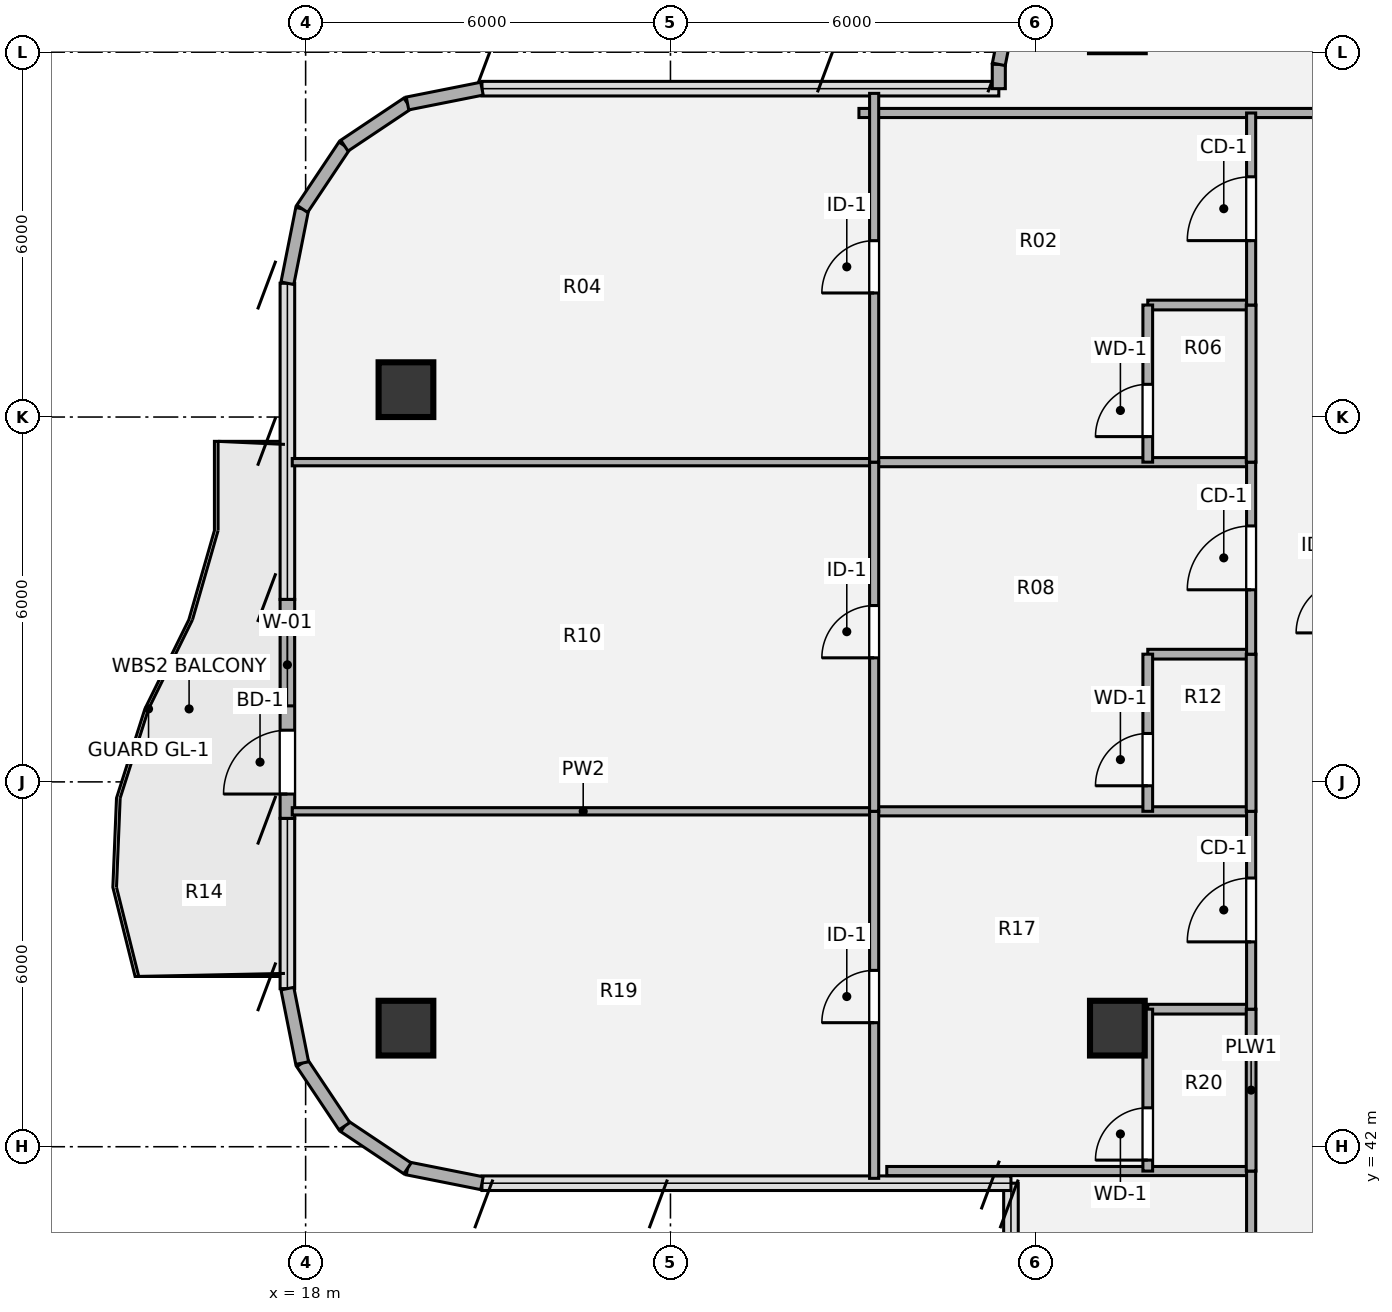
"""IFC4 building model, lengths in metres.
Left out: names, types, materials, properties, quantities, classifications, styles, units other than length and angle.
Written with IfcOpenShell. Run it as: python <this file> out.ifc"""

import sys

from ifc_helpers import new_model, si_unit, direction, frame, frame_2d, origin, origin_2d, place, context, subcontext, project, spatial, rectangle, hollow_circle, extrude, source, transform, mapped, element, fill, save


model = new_model("IFC4")
c1 = context("Model", 3, precision=1e-05, world=origin(), true_north=direction((0.0, 1.0)))
c2 = subcontext(c1, "Body", "Model", "MODEL_VIEW")
j1 = project(units=[si_unit("LENGTHUNIT", "METRE"), si_unit("PLANEANGLEUNIT", "RADIAN")], contexts=[c1])
p1 = place(None, origin())
s1 = spatial("IfcSite", under=j1, at=p1, CompositionType="ELEMENT")
p2 = place(p1, origin())
s2 = spatial("IfcBuilding", under=s1, at=p2, CompositionType="ELEMENT")
p3 = place(p2, frame((0.0, 0.0, 234.36)))
s3 = spatial("IfcBuildingStorey", under=s2, at=p3, CompositionType="ELEMENT", Elevation=234.36)
m1 = source(origin(), c2, "Body", "SweptSolid", [
    extrude(hollow_circle(Radius=0.45, WallThickness=0.032, at=origin_2d()), origin(), (0.0, 0.0, 1.0), 3.78),
])
for number, where, z_axis, x_axis in (
    (1, (19.65, 43.95, 0.0), (0.0, 0.0, 1.0), (1.0, 0.0, 0.0)),
    (2, (19.65, 54.45, 0.0), (0.0, 0.0, 1.0), (1.0, 0.0, 0.0)),
    (3, (31.35, 43.95, 0.0), (0.0, 0.0, 1.0), (1.0, 0.0, 0.0)),
):
    element("IfcColumn", number, at=place(p3, frame(where, z_axis=z_axis, x_axis=x_axis)), inside=s3, PredefinedType="COLUMN", context=c2, shape_type="MappedRepresentation", body=[
        mapped(m1, transform((0.0, 0.0, 0.0), x_axis=(1.0, 0.0, 0.0), y_axis=(0.0, 1.0, 0.0), z_axis=(0.0, 0.0, 1.0), scale=1.0)),
    ])
for number, where, z_axis, x_axis in (
    (4, (20.9, 41.4, 0.0), (0.0, 0.0, 1.0), (-0.981, 0.195, 0.0)),
    (5, (19.675, 41.644, 0.0), (0.0, 0.0, 1.0), (-0.831, 0.556, 0.0)),
    (6, (18.637, 42.337, 0.0), (0.0, 0.0, 1.0), (-0.556, 0.831, 0.0)),
    (7, (17.944, 43.375, 0.0), (0.0, 0.0, 1.0), (-0.195, 0.981, 0.0)),
):
    element("IfcWall", number, at=place(p3, frame(where, z_axis=z_axis, x_axis=x_axis)), inside=s3, PredefinedType="SOLIDWALL", context=c2, shape_type="SweptSolid", body=[
        extrude(rectangle(XDim=1.249, YDim=0.215, at=frame_2d((0.624, 0.0))), origin(), (0.0, 0.0, 1.0), 3.53),
    ])
p4 = place(p3, frame((17.7, 47.4, 0.0), z_axis=(0.0, 0.0, 1.0), x_axis=(0.0, 1.0, 0.0)))
e8 = element("IfcWall", 8, at=p4, inside=s3, PredefinedType="SOLIDWALL", context=c2, shape_type="SweptSolid", body=[
    extrude(rectangle(XDim=3.6, YDim=0.24, at=frame_2d((1.8, 0.0))), origin(), (0.0, 0.0, 1.0), 3.53),
])
p5 = place(p4, frame((0.4, 0.0, 0.0)))
e9 = element("IfcOpeningElement", 9, at=p5, cuts=e8, PredefinedType="OPENING", context=c2, shape_type="SweptSolid", body=[
    extrude(rectangle(XDim=1.05, YDim=2.15, at=origin_2d()), frame((0.525, 0.13, 1.075), z_axis=(0.0, -1.0, 0.0), x_axis=(1.0, 0.0, 0.0)), (0.0, 0.0, 1.0), 0.26),
])
p6 = place(p4, frame((1.85, 0.0, 0.85)))
e10 = element("IfcOpeningElement", 10, at=p6, cuts=e8, PredefinedType="OPENING", context=c2, shape_type="SweptSolid", body=[
    extrude(rectangle(XDim=1.35, YDim=1.35, at=origin_2d()), frame((0.675, 0.13, 0.675), z_axis=(0.0, -1.0, 0.0), x_axis=(1.0, 0.0, 0.0)), (0.0, 0.0, 1.0), 0.26),
])
for number, where, z_axis, x_axis in (
    (11, (17.7, 56.2, 0.0), (0.0, 0.0, 1.0), (0.195, 0.981, 0.0)),
    (12, (17.944, 57.425, 0.0), (0.0, 0.0, 1.0), (0.556, 0.831, 0.0)),
    (13, (18.637, 58.463, 0.0), (0.0, 0.0, 1.0), (0.831, 0.556, 0.0)),
    (14, (19.675, 59.156, 0.0), (0.0, 0.0, 1.0), (0.981, 0.195, 0.0)),
):
    element("IfcWall", number, at=place(p3, frame(where, z_axis=z_axis, x_axis=x_axis)), inside=s3, PredefinedType="SOLIDWALL", context=c2, shape_type="SweptSolid", body=[
        extrude(rectangle(XDim=1.249, YDim=0.215, at=frame_2d((0.624, 0.0))), origin(), (0.0, 0.0, 1.0), 3.53),
    ])
p7 = place(p3, frame((29.4, 59.4, 0.0), z_axis=(0.0, 0.0, 1.0), x_axis=(0.0, 1.0, 0.0)))
e15 = element("IfcWall", 15, at=p7, inside=s3, PredefinedType="SOLIDWALL", context=c2, shape_type="SweptSolid", body=[
    extrude(rectangle(XDim=0.4, YDim=0.215, at=frame_2d((0.2, 0.0))), origin(), (0.0, 0.0, 1.0), 3.53),
])
p8 = place(p3, frame((29.4, 59.8, 0.0), z_axis=(0.0, 0.0, 1.0), x_axis=(0.195190360752, 0.980765376158, 0.0)))
e16 = element("IfcWall", 16, at=p8, inside=s3, PredefinedType="SOLIDWALL", context=c2, shape_type="SweptSolid", body=[
    extrude(rectangle(XDim=1.014, YDim=0.215, at=frame_2d((0.507, 0.0))), origin(), (0.0, 0.0, 1.0), 3.53),
])
p9 = place(p3, frame((27.558, 41.6, 0.0), z_axis=(0.0, 0.0, 1.0), x_axis=(1.0, 0.0, 0.0)))
e17 = element("IfcWall", 17, at=p9, inside=s3, PredefinedType="PARTITIONING", context=c2, shape_type="SweptSolid", body=[
    extrude(rectangle(XDim=5.992, YDim=0.15, at=frame_2d((2.996, 0.0))), origin(), (0.0, 0.0, 1.0), 3.5),
])
p10 = place(p3, frame((31.85, 44.262, 0.0), z_axis=(0.0, 0.0, 1.0), x_axis=(1.0, 0.0, 0.0)))
e18 = element("IfcWall", 18, at=p10, inside=s3, PredefinedType="PLUMBINGWALL", context=c2, shape_type="SweptSolid", body=[
    extrude(rectangle(XDim=1.7, YDim=0.16, at=frame_2d((0.85, 0.0))), origin(), (0.0, 0.0, 1.0), 2.903),
])
p11 = place(p3, frame((17.78, 47.516, 0.0), z_axis=(0.0, 0.0, 1.0), x_axis=(1.0, 0.0, 0.0)))
e19 = element("IfcWall", 19, at=p11, inside=s3, PredefinedType="PARTITIONING", context=c2, shape_type="SweptSolid", body=[
    extrude(rectangle(XDim=9.57, YDim=0.12, at=frame_2d((4.785, 0.0))), origin(), (0.0, 0.0, 1.0), 2.982),
])
p12 = place(p3, frame((27.35, 47.516, 0.0), z_axis=(0.0, 0.0, 1.0), x_axis=(1.0, 0.0, 0.0)))
e20 = element("IfcWall", 20, at=p12, inside=s3, PredefinedType="PARTITIONING", context=c2, shape_type="SweptSolid", body=[
    extrude(rectangle(XDim=6.2, YDim=0.15, at=frame_2d((3.1, 0.0))), origin(), (0.0, 0.0, 1.0), 2.982),
])
p13 = place(p3, frame((31.85, 50.1, 0.0), z_axis=(0.0, 0.0, 1.0), x_axis=(1.0, 0.0, 0.0)))
e21 = element("IfcWall", 21, at=p13, inside=s3, PredefinedType="PLUMBINGWALL", context=c2, shape_type="SweptSolid", body=[
    extrude(rectangle(XDim=1.7, YDim=0.16, at=frame_2d((0.85, 0.0))), origin(), (0.0, 0.0, 1.0), 3.259),
])
p14 = place(p3, frame((17.78, 53.258, 0.0), z_axis=(0.0, 0.0, 1.0), x_axis=(1.0, 0.0, 0.0)))
e22 = element("IfcWall", 22, at=p14, inside=s3, PredefinedType="PARTITIONING", context=c2, shape_type="SweptSolid", body=[
    extrude(rectangle(XDim=9.57, YDim=0.12, at=frame_2d((4.785, 0.0))), origin(), (0.0, 0.0, 1.0), 3.055),
])
p15 = place(p3, frame((27.35, 53.258, 0.0), z_axis=(0.0, 0.0, 1.0), x_axis=(1.0, 0.0, 0.0)))
e23 = element("IfcWall", 23, at=p15, inside=s3, PredefinedType="PARTITIONING", context=c2, shape_type="SweptSolid", body=[
    extrude(rectangle(XDim=6.2, YDim=0.15, at=frame_2d((3.1, 0.0))), origin(), (0.0, 0.0, 1.0), 3.055),
])
p16 = place(p3, frame((31.85, 55.842, 0.0), z_axis=(0.0, 0.0, 1.0), x_axis=(1.0, 0.0, 0.0)))
e24 = element("IfcWall", 24, at=p16, inside=s3, PredefinedType="PLUMBINGWALL", context=c2, shape_type="SweptSolid", body=[
    extrude(rectangle(XDim=1.7, YDim=0.16, at=frame_2d((0.85, 0.0))), origin(), (0.0, 0.0, 1.0), 3.259),
])
p17 = place(p3, frame((27.1, 59.0, 0.0), z_axis=(0.0, 0.0, 1.0), x_axis=(1.0, 0.0, 0.0)))
e25 = element("IfcWall", 25, at=p17, inside=s3, PredefinedType="PARTITIONING", context=c2, shape_type="SweptSolid", body=[
    extrude(rectangle(XDim=17.8, YDim=0.15, at=frame_2d((8.9, 0.0))), origin(), (0.0, 0.0, 1.0), 3.308),
])
p18 = place(p17, frame((8.375, 0.0, 0.0)))
e26 = element("IfcOpeningElement", 26, at=p18, cuts=e25, PredefinedType="OPENING", context=c2, shape_type="SweptSolid", body=[
    extrude(rectangle(XDim=1.05, YDim=2.1, at=origin_2d()), frame((0.525, 0.085, 1.05), z_axis=(0.0, -1.0, 0.0), x_axis=(1.0, 0.0, 0.0)), (0.0, 0.0, 1.0), 0.17),
])
p19 = place(p3, frame((27.35, 41.48, 0.0), z_axis=(0.0, 0.0, 1.0), x_axis=(0.0, 1.0, 0.0)))
e27 = element("IfcWall", 27, at=p19, inside=s3, PredefinedType="PARTITIONING", context=c2, shape_type="SweptSolid", body=[
    extrude(rectangle(XDim=6.036, YDim=0.15, at=frame_2d((3.018, 0.0))), origin(), (0.0, 0.0, 1.0), 3.5),
])
p20 = place(p19, frame((2.56, 0.0, 0.0)))
e28 = element("IfcOpeningElement", 28, at=p20, cuts=e27, PredefinedType="OPENING", context=c2, shape_type="SweptSolid", body=[
    extrude(rectangle(XDim=0.86, YDim=2.1, at=origin_2d()), frame((0.43, 0.085, 1.05), z_axis=(0.0, -1.0, 0.0), x_axis=(1.0, 0.0, 0.0)), (0.0, 0.0, 1.0), 0.17),
])
p21 = place(p3, frame((27.35, 47.516, 0.0), z_axis=(0.0, 0.0, 1.0), x_axis=(0.0, 1.0, 0.0)))
e29 = element("IfcWall", 29, at=p21, inside=s3, PredefinedType="PARTITIONING", context=c2, shape_type="SweptSolid", body=[
    extrude(rectangle(XDim=5.742, YDim=0.15, at=frame_2d((2.871, 0.0))), origin(), (0.0, 0.0, 1.0), 3.5),
])
p22 = place(p21, frame((2.524, 0.0, 0.0)))
e30 = element("IfcOpeningElement", 30, at=p22, cuts=e29, PredefinedType="OPENING", context=c2, shape_type="SweptSolid", body=[
    extrude(rectangle(XDim=0.86, YDim=2.1, at=origin_2d()), frame((0.43, 0.085, 1.05), z_axis=(0.0, -1.0, 0.0), x_axis=(1.0, 0.0, 0.0)), (0.0, 0.0, 1.0), 0.17),
])
p23 = place(p3, frame((27.35, 53.258, 0.0), z_axis=(0.0, 0.0, 1.0), x_axis=(0.0, 1.0, 0.0)))
e31 = element("IfcWall", 31, at=p23, inside=s3, PredefinedType="PARTITIONING", context=c2, shape_type="SweptSolid", body=[
    extrude(rectangle(XDim=6.064, YDim=0.15, at=frame_2d((3.032, 0.0))), origin(), (0.0, 0.0, 1.0), 3.5),
])
p24 = place(p23, frame((2.782, 0.0, 0.0)))
e32 = element("IfcOpeningElement", 32, at=p24, cuts=e31, PredefinedType="OPENING", context=c2, shape_type="SweptSolid", body=[
    extrude(rectangle(XDim=0.86, YDim=2.1, at=origin_2d()), frame((0.43, 0.085, 1.05), z_axis=(0.0, -1.0, 0.0), x_axis=(1.0, 0.0, 0.0)), (0.0, 0.0, 1.0), 0.17),
])
p25 = place(p3, frame((31.85, 41.6, 0.0), z_axis=(0.0, 0.0, 1.0), x_axis=(0.0, 1.0, 0.0)))
e33 = element("IfcWall", 33, at=p25, inside=s3, PredefinedType="PLUMBINGWALL", context=c2, shape_type="SweptSolid", body=[
    extrude(rectangle(XDim=2.662, YDim=0.16, at=frame_2d((1.331, 0.0))), origin(), (0.0, 0.0, 1.0), 3.5),
])
p26 = place(p25, frame((0.18, 0.0, 0.0)))
e34 = element("IfcOpeningElement", 34, at=p26, cuts=e33, PredefinedType="OPENING", context=c2, shape_type="SweptSolid", body=[
    extrude(rectangle(XDim=0.86, YDim=2.1, at=origin_2d()), frame((0.43, 0.09, 1.05), z_axis=(0.0, -1.0, 0.0), x_axis=(1.0, 0.0, 0.0)), (0.0, 0.0, 1.0), 0.18),
])
p27 = place(p3, frame((31.85, 47.516, 0.0), z_axis=(0.0, 0.0, 1.0), x_axis=(0.0, 1.0, 0.0)))
e35 = element("IfcWall", 35, at=p27, inside=s3, PredefinedType="PLUMBINGWALL", context=c2, shape_type="SweptSolid", body=[
    extrude(rectangle(XDim=2.584, YDim=0.16, at=frame_2d((1.292, 0.0))), origin(), (0.0, 0.0, 1.0), 3.5),
])
p28 = place(p27, frame((0.42, 0.0, 0.0)))
e36 = element("IfcOpeningElement", 36, at=p28, cuts=e35, PredefinedType="OPENING", context=c2, shape_type="SweptSolid", body=[
    extrude(rectangle(XDim=0.86, YDim=2.1, at=origin_2d()), frame((0.43, 0.09, 1.05), z_axis=(0.0, -1.0, 0.0), x_axis=(1.0, 0.0, 0.0)), (0.0, 0.0, 1.0), 0.18),
])
p29 = place(p3, frame((31.85, 53.258, 0.0), z_axis=(0.0, 0.0, 1.0), x_axis=(0.0, 1.0, 0.0)))
e37 = element("IfcWall", 37, at=p29, inside=s3, PredefinedType="PLUMBINGWALL", context=c2, shape_type="SweptSolid", body=[
    extrude(rectangle(XDim=2.584, YDim=0.16, at=frame_2d((1.292, 0.0))), origin(), (0.0, 0.0, 1.0), 3.5),
])
p30 = place(p29, frame((0.42, 0.0, 0.0)))
e38 = element("IfcOpeningElement", 38, at=p30, cuts=e37, PredefinedType="OPENING", context=c2, shape_type="SweptSolid", body=[
    extrude(rectangle(XDim=0.86, YDim=2.1, at=origin_2d()), frame((0.43, 0.09, 1.05), z_axis=(0.0, -1.0, 0.0), x_axis=(1.0, 0.0, 0.0)), (0.0, 0.0, 1.0), 0.18),
])
p31 = place(p3, frame((33.55, 22.8, 0.0), z_axis=(0.0, 0.0, 1.0), x_axis=(0.0, 1.0, 0.0)))
e39 = element("IfcWall", 39, at=p31, inside=s3, PredefinedType="PARTITIONING", context=c2, shape_type="SweptSolid", body=[
    extrude(rectangle(XDim=18.8, YDim=0.15, at=frame_2d((9.4, 0.0))), origin(), (0.0, 0.0, 1.0), 3.5),
])
p32 = place(p31, frame((8.84, 0.0, 0.0)))
e40 = element("IfcOpeningElement", 40, at=p32, cuts=e39, PredefinedType="OPENING", context=c2, shape_type="SweptSolid", body=[
    extrude(rectangle(XDim=0.86, YDim=2.1, at=origin_2d()), frame((0.43, 0.085, 1.05), z_axis=(0.0, -1.0, 0.0), x_axis=(1.0, 0.0, 0.0)), (0.0, 0.0, 1.0), 0.17),
])
p33 = place(p3, frame((33.55, 41.6, 0.0), z_axis=(0.0, 0.0, 1.0), x_axis=(0.0, 1.0, 0.0)))
e41 = element("IfcWall", 41, at=p33, inside=s3, PredefinedType="PLUMBINGWALL", context=c2, shape_type="SweptSolid", body=[
    extrude(rectangle(XDim=2.662, YDim=0.16, at=frame_2d((1.331, 0.0))), origin(), (0.0, 0.0, 1.0), 3.5),
])
p34 = place(p3, frame((33.55, 44.262, 0.0), z_axis=(0.0, 0.0, 1.0), x_axis=(0.0, 1.0, 0.0)))
e42 = element("IfcWall", 42, at=p34, inside=s3, PredefinedType="PARTITIONING", context=c2, shape_type="SweptSolid", body=[
    extrude(rectangle(XDim=3.254, YDim=0.15, at=frame_2d((1.627, 0.0))), origin(), (0.0, 0.0, 1.0), 3.5),
])
p35 = place(p34, frame((1.107, 0.0, 0.0)))
e43 = element("IfcOpeningElement", 43, at=p35, cuts=e42, PredefinedType="OPENING", context=c2, shape_type="SweptSolid", body=[
    extrude(rectangle(XDim=1.05, YDim=2.1, at=origin_2d()), frame((0.525, 0.085, 1.05), z_axis=(0.0, -1.0, 0.0), x_axis=(1.0, 0.0, 0.0)), (0.0, 0.0, 1.0), 0.17),
])
p36 = place(p3, frame((33.55, 47.516, 0.0), z_axis=(0.0, 0.0, 1.0), x_axis=(0.0, 1.0, 0.0)))
e44 = element("IfcWall", 44, at=p36, inside=s3, PredefinedType="PLUMBINGWALL", context=c2, shape_type="SweptSolid", body=[
    extrude(rectangle(XDim=2.584, YDim=0.16, at=frame_2d((1.292, 0.0))), origin(), (0.0, 0.0, 1.0), 3.5),
])
p37 = place(p3, frame((33.55, 50.1, 0.0), z_axis=(0.0, 0.0, 1.0), x_axis=(0.0, 1.0, 0.0)))
e45 = element("IfcWall", 45, at=p37, inside=s3, PredefinedType="PARTITIONING", context=c2, shape_type="SweptSolid", body=[
    extrude(rectangle(XDim=3.158, YDim=0.15, at=frame_2d((1.579, 0.0))), origin(), (0.0, 0.0, 1.0), 3.5),
])
p38 = place(p37, frame((1.059, 0.0, 0.0)))
e46 = element("IfcOpeningElement", 46, at=p38, cuts=e45, PredefinedType="OPENING", context=c2, shape_type="SweptSolid", body=[
    extrude(rectangle(XDim=1.05, YDim=2.1, at=origin_2d()), frame((0.525, 0.085, 1.05), z_axis=(0.0, -1.0, 0.0), x_axis=(1.0, 0.0, 0.0)), (0.0, 0.0, 1.0), 0.17),
])
p39 = place(p3, frame((33.55, 53.258, 0.0), z_axis=(0.0, 0.0, 1.0), x_axis=(0.0, 1.0, 0.0)))
e47 = element("IfcWall", 47, at=p39, inside=s3, PredefinedType="PLUMBINGWALL", context=c2, shape_type="SweptSolid", body=[
    extrude(rectangle(XDim=2.584, YDim=0.16, at=frame_2d((1.292, 0.0))), origin(), (0.0, 0.0, 1.0), 3.5),
])
p40 = place(p3, frame((33.55, 55.842, 0.0), z_axis=(0.0, 0.0, 1.0), x_axis=(0.0, 1.0, 0.0)))
e48 = element("IfcWall", 48, at=p40, inside=s3, PredefinedType="PARTITIONING", context=c2, shape_type="SweptSolid", body=[
    extrude(rectangle(XDim=3.158, YDim=0.15, at=frame_2d((1.579, 0.0))), origin(), (0.0, 0.0, 1.0), 3.5),
])
p41 = place(p40, frame((1.059, 0.0, 0.0)))
e49 = element("IfcOpeningElement", 49, at=p41, cuts=e48, PredefinedType="OPENING", context=c2, shape_type="SweptSolid", body=[
    extrude(rectangle(XDim=1.05, YDim=2.1, at=origin_2d()), frame((0.525, 0.085, 1.05), z_axis=(0.0, -1.0, 0.0), x_axis=(1.0, 0.0, 0.0)), (0.0, 0.0, 1.0), 0.17),
])
m2 = source(origin(), c2, "Body", "SweptSolid", [
    extrude(rectangle(XDim=1.05, YDim=2.15, at=origin_2d()), frame((0.525, 0.025, 1.075), z_axis=(0.0, -1.0, 0.0), x_axis=(1.0, 0.0, 0.0)), (0.0, 0.0, 1.0), 0.05),
])
p42 = place(p5, origin())
e50 = element("IfcDoor", 50, at=p42, inside=s3, OperationType="SINGLE_SWING_LEFT", PredefinedType="DOOR", context=c2, shape_type="MappedRepresentation", body=[
    mapped(m2, transform((0.0, 0.0, 0.0), x_axis=(1.0, 0.0, 0.0), y_axis=(0.0, 1.0, 0.0), z_axis=(0.0, 0.0, 1.0), scale=1.0)),
])
fill(e9, e50)
m3 = source(origin(), c2, "Body", "SweptSolid", [
    extrude(rectangle(XDim=1.35, YDim=1.35, at=origin_2d()), frame((0.675, 0.03, 0.675), z_axis=(0.0, -1.0, 0.0), x_axis=(1.0, 0.0, 0.0)), (0.0, 0.0, 1.0), 0.06),
])
p43 = place(p6, origin())
e51 = element("IfcWindow", 51, at=p43, inside=s3, PartitioningType="SINGLE_PANEL", PredefinedType="WINDOW", context=c2, shape_type="MappedRepresentation", body=[
    mapped(m3, transform((0.0, 0.0, 0.0), x_axis=(1.0, 0.0, 0.0), y_axis=(0.0, 1.0, 0.0), z_axis=(0.0, 0.0, 1.0), scale=1.0)),
])
fill(e10, e51)
m4 = source(origin(), c2, "Body", "SweptSolid", [
    extrude(rectangle(XDim=0.86, YDim=2.1, at=origin_2d()), frame((0.43, 0.025, 1.05), z_axis=(0.0, -1.0, 0.0), x_axis=(1.0, 0.0, 0.0)), (0.0, 0.0, 1.0), 0.05),
])
p44 = place(p20, origin())
e52 = element("IfcDoor", 52, at=p44, inside=s3, OperationType="SINGLE_SWING_LEFT", PredefinedType="DOOR", context=c2, shape_type="MappedRepresentation", body=[
    mapped(m4, transform((0.0, 0.0, 0.0), x_axis=(1.0, 0.0, 0.0), y_axis=(0.0, 1.0, 0.0), z_axis=(0.0, 0.0, 1.0), scale=1.0)),
])
fill(e28, e52)
p45 = place(p22, origin())
e53 = element("IfcDoor", 53, at=p45, inside=s3, OperationType="SINGLE_SWING_LEFT", PredefinedType="DOOR", context=c2, shape_type="MappedRepresentation", body=[
    mapped(m4, transform((0.0, 0.0, 0.0), x_axis=(1.0, 0.0, 0.0), y_axis=(0.0, 1.0, 0.0), z_axis=(0.0, 0.0, 1.0), scale=1.0)),
])
fill(e30, e53)
p46 = place(p24, origin())
e54 = element("IfcDoor", 54, at=p46, inside=s3, OperationType="SINGLE_SWING_LEFT", PredefinedType="DOOR", context=c2, shape_type="MappedRepresentation", body=[
    mapped(m4, transform((0.0, 0.0, 0.0), x_axis=(1.0, 0.0, 0.0), y_axis=(0.0, 1.0, 0.0), z_axis=(0.0, 0.0, 1.0), scale=1.0)),
])
fill(e32, e54)
m5 = source(origin(), c2, "Body", "SweptSolid", [
    extrude(rectangle(XDim=0.86, YDim=2.1, at=origin_2d()), frame((0.43, 0.025, 1.05), z_axis=(0.0, -1.0, 0.0), x_axis=(1.0, 0.0, 0.0)), (0.0, 0.0, 1.0), 0.05),
])
p47 = place(p26, origin())
e55 = element("IfcDoor", 55, at=p47, inside=s3, OperationType="SINGLE_SWING_LEFT", PredefinedType="DOOR", context=c2, shape_type="MappedRepresentation", body=[
    mapped(m5, transform((0.0, 0.0, 0.0), x_axis=(1.0, 0.0, 0.0), y_axis=(0.0, 1.0, 0.0), z_axis=(0.0, 0.0, 1.0), scale=1.0)),
])
fill(e34, e55)
p48 = place(p28, origin())
e56 = element("IfcDoor", 56, at=p48, inside=s3, OperationType="SINGLE_SWING_LEFT", PredefinedType="DOOR", context=c2, shape_type="MappedRepresentation", body=[
    mapped(m5, transform((0.0, 0.0, 0.0), x_axis=(1.0, 0.0, 0.0), y_axis=(0.0, 1.0, 0.0), z_axis=(0.0, 0.0, 1.0), scale=1.0)),
])
fill(e36, e56)
p49 = place(p30, origin())
e57 = element("IfcDoor", 57, at=p49, inside=s3, OperationType="SINGLE_SWING_LEFT", PredefinedType="DOOR", context=c2, shape_type="MappedRepresentation", body=[
    mapped(m5, transform((0.0, 0.0, 0.0), x_axis=(1.0, 0.0, 0.0), y_axis=(0.0, 1.0, 0.0), z_axis=(0.0, 0.0, 1.0), scale=1.0)),
])
fill(e38, e57)
m6 = source(origin(), c2, "Body", "SweptSolid", [
    extrude(rectangle(XDim=1.05, YDim=2.1, at=origin_2d()), frame((0.525, 0.025, 1.05), z_axis=(0.0, -1.0, 0.0), x_axis=(1.0, 0.0, 0.0)), (0.0, 0.0, 1.0), 0.05),
])
p50 = place(p35, origin())
e58 = element("IfcDoor", 58, at=p50, inside=s3, OperationType="SINGLE_SWING_LEFT", PredefinedType="DOOR", context=c2, shape_type="MappedRepresentation", body=[
    mapped(m6, transform((0.0, 0.0, 0.0), x_axis=(1.0, 0.0, 0.0), y_axis=(0.0, 1.0, 0.0), z_axis=(0.0, 0.0, 1.0), scale=1.0)),
])
fill(e43, e58)
p51 = place(p38, origin())
e59 = element("IfcDoor", 59, at=p51, inside=s3, OperationType="SINGLE_SWING_LEFT", PredefinedType="DOOR", context=c2, shape_type="MappedRepresentation", body=[
    mapped(m6, transform((0.0, 0.0, 0.0), x_axis=(1.0, 0.0, 0.0), y_axis=(0.0, 1.0, 0.0), z_axis=(0.0, 0.0, 1.0), scale=1.0)),
])
fill(e46, e59)
p52 = place(p41, origin())
e60 = element("IfcDoor", 60, at=p52, inside=s3, OperationType="SINGLE_SWING_LEFT", PredefinedType="DOOR", context=c2, shape_type="MappedRepresentation", body=[
    mapped(m6, transform((0.0, 0.0, 0.0), x_axis=(1.0, 0.0, 0.0), y_axis=(0.0, 1.0, 0.0), z_axis=(0.0, 0.0, 1.0), scale=1.0)),
])
fill(e49, e60)
save(model, sys.argv[1])
